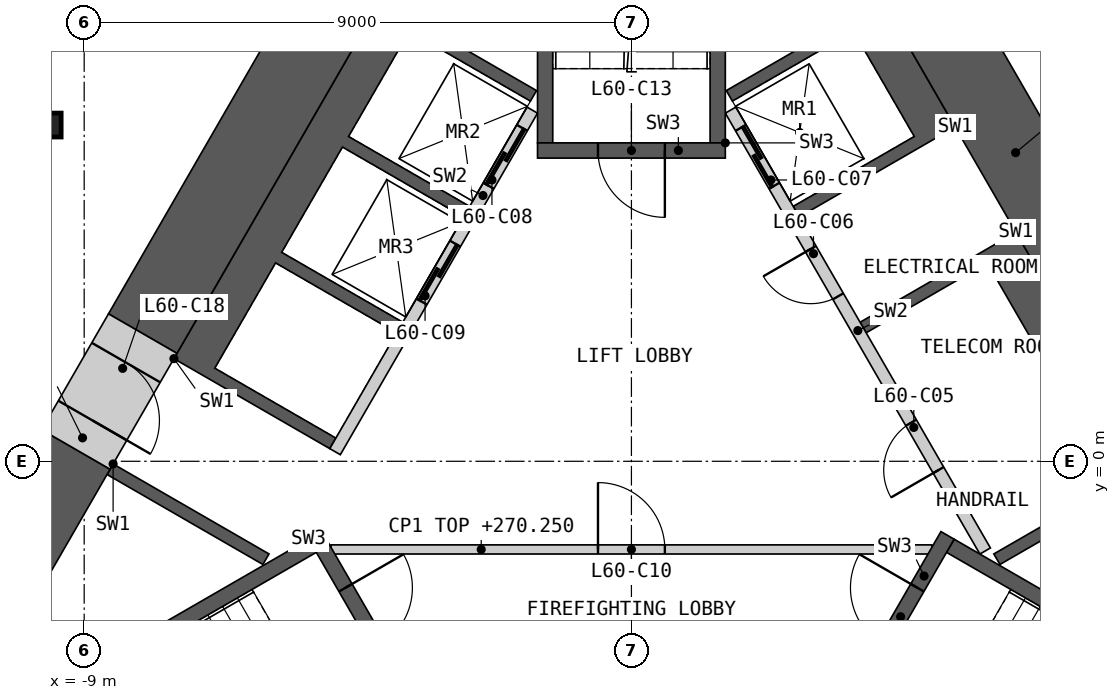
"""IFC4 building model, lengths in metres.
Left out: names, types, materials, properties, quantities, classifications, styles, units other than length and angle.
Written with IfcOpenShell. Run it as: python <this file> out.ifc"""

import sys

from ifc_helpers import new_model, si_unit, direction, frame, frame_2d, origin, origin_2d, place, context, subcontext, project, spatial, polyline, rectangle, i_section, outline, extrude, element, fill, save


model = new_model("IFC4")
c1 = context("Model", 3, precision=1e-05, world=origin(), true_north=direction((0.0, 1.0)))
c2 = subcontext(c1, "Body", "Model", "MODEL_VIEW")
j1 = project(units=[si_unit("LENGTHUNIT", "METRE"), si_unit("PLANEANGLEUNIT", "RADIAN")], contexts=[c1])
p1 = place(None, origin())
s1 = spatial("IfcSite", under=j1, at=p1, CompositionType="ELEMENT")
p2 = place(p1, origin())
s2 = spatial("IfcBuilding", under=s1, at=p2, CompositionType="ELEMENT")
p3 = place(p2, frame((0.0, 0.0, 267.0)))
s3 = spatial("IfcBuildingStorey", under=s2, at=p3, CompositionType="ELEMENT", Elevation=267.0)
p4 = place(p3, frame((-9.578, 5.53, 0.0), z_axis=(0.0, 0.0, 1.0), x_axis=(1.0, 0.0, 0.0)))
e1 = element("IfcColumn", 1, at=p4, inside=s3, PredefinedType="COLUMN", context=c2, shape_type="SweptSolid", body=[
    extrude(i_section(OverallWidth=0.399, OverallDepth=0.393, WebThickness=0.023, FlangeThickness=0.037, at=origin_2d()), origin(), (0.0, 0.0, 1.0), 3.6),
])
p5 = place(p3, origin())
e2 = element("IfcWall", 2, at=p5, inside=s3, PredefinedType="SHEAR", context=c2, shape_type="SweptSolid", body=[
    extrude(outline(polyline([(6.324, 3.767), (8.624, -0.217), (8.231, -0.444), (6.061, -1.697), (5.96, -1.524), (7.952, -0.374), (5.852, 3.263), (3.861, 2.113), (3.76, 2.287), (5.931, 3.54), (6.324, 3.767)])), origin(), (0.0, 0.0, 1.0), 3.25),
])
p6 = place(p3, origin())
e3 = element("IfcWall", 3, at=p6, inside=s3, PredefinedType="SHEAR", context=c2, shape_type="SweptSolid", body=[
    extrude(outline(polyline([(5.324, 5.499), (4.931, 5.272), (2.76, 4.019), (2.66, 4.192), (4.652, 5.342), (3.652, 7.074), (1.66, 5.924), (1.561, 6.097), (3.731, 7.35), (4.124, 7.577), (5.324, 5.499)])), origin(), (0.0, 0.0, 1.0), 3.25),
])
p7 = place(p3, frame((5.817, -1.476, 0.0), z_axis=(0.0, 0.0, 1.0), x_axis=(-0.500002616675, 0.866023893041, 0.0)))
e4 = element("IfcWall", 4, at=p7, inside=s3, PredefinedType="SOLIDWALL", context=c2, shape_type="SweptSolid", body=[
    extrude(rectangle(XDim=8.373, YDim=0.2, at=frame_2d((4.187, 0.0))), origin(), (0.0, 0.0, 1.0), 3.25),
])
p8 = place(p7, frame((1.537, 0.0, 0.0)))
e5 = element("IfcOpeningElement", 5, at=p8, cuts=e4, PredefinedType="OPENING", context=c2, shape_type="SweptSolid", body=[
    extrude(rectangle(XDim=0.9, YDim=2.1, at=frame_2d((0.45, 1.05))), frame((0.0, 0.11, 0.0), z_axis=(0.0, -1.0, 0.0), x_axis=(1.0, 0.0, 0.0)), (0.0, 0.0, 1.0), 0.22),
])
p9 = place(p7, frame((4.837, 0.0, 0.0)))
e6 = element("IfcOpeningElement", 6, at=p9, cuts=e4, PredefinedType="OPENING", context=c2, shape_type="SweptSolid", body=[
    extrude(rectangle(XDim=0.9, YDim=2.1, at=frame_2d((0.45, 1.05))), frame((0.0, 0.11, 0.0), z_axis=(0.0, -1.0, 0.0), x_axis=(1.0, 0.0, 0.0)), (0.0, 0.0, 1.0), 0.22),
])
p10 = place(p7, frame((6.937, 0.0, 0.0)))
e7 = element("IfcOpeningElement", 7, at=p10, cuts=e4, PredefinedType="OPENING", context=c2, shape_type="SweptSolid", body=[
    extrude(rectangle(XDim=1.1, YDim=2.1, at=frame_2d((0.55, 1.05))), frame((0.0, 0.11, 0.0), z_axis=(0.0, -1.0, 0.0), x_axis=(1.0, 0.0, 0.0)), (0.0, 0.0, 1.0), 0.22),
])
p11 = place(p3, origin())
e8 = element("IfcWall", 8, at=p11, inside=s3, PredefinedType="SHEAR", context=c2, shape_type="SweptSolid", body=[
    extrude(outline(polyline([(-7.524, 1.688), (-4.124, 7.577), (-3.731, 7.35), (-1.561, 6.097), (-1.66, 5.924), (-3.652, 7.074), (-4.652, 5.342), (-2.66, 4.192), (-2.76, 4.019), (-4.752, 5.169), (-5.752, 3.437), (-3.76, 2.287), (-3.861, 2.113), (-5.852, 3.263), (-6.852, 1.531), (-4.861, 0.381), (-4.96, 0.208), (-7.131, 1.461), (-7.524, 1.688)])), origin(), (0.0, 0.0, 1.0), 3.25),
])
p12 = place(p3, origin())
e9 = element("IfcWall", 9, at=p12, inside=s3, PredefinedType="SHEAR", context=c2, shape_type="SweptSolid", body=[
    extrude(outline(polyline([(-8.524, -0.044), (-8.131, -0.271), (-5.96, -1.524), (-6.061, -1.697), (-8.231, -0.444), (-8.624, -0.217), (-8.524, -0.044)])), origin(), (0.0, 0.0, 1.0), 3.25),
])
p13 = place(p3, frame((-1.631, 5.776, 0.0), z_axis=(0.0, 0.0, 1.0), x_axis=(-0.499992876559, -0.866029516466, 0.0)))
e10 = element("IfcWall", 10, at=p13, inside=s3, PredefinedType="SOLIDWALL", context=c2, shape_type="SweptSolid", body=[
    extrude(rectangle(XDim=6.486, YDim=0.2, at=frame_2d((3.243, 0.0))), origin(), (0.0, 0.0, 1.0), 3.25),
])
p14 = place(p13, frame((0.337, 0.0, 0.0)))
e11 = element("IfcOpeningElement", 11, at=p14, cuts=e10, PredefinedType="OPENING", context=c2, shape_type="SweptSolid", body=[
    extrude(rectangle(XDim=1.1, YDim=2.1, at=frame_2d((0.55, 1.05))), frame((0.0, 0.11, 0.0), z_axis=(0.0, -1.0, 0.0), x_axis=(1.0, 0.0, 0.0)), (0.0, 0.0, 1.0), 0.22),
])
p15 = place(p13, frame((2.537, 0.0, 0.0)))
e12 = element("IfcOpeningElement", 12, at=p15, cuts=e10, PredefinedType="OPENING", context=c2, shape_type="SweptSolid", body=[
    extrude(rectangle(XDim=1.1, YDim=2.1, at=frame_2d((0.55, 1.05))), frame((0.0, 0.11, 0.0), z_axis=(0.0, -1.0, 0.0), x_axis=(1.0, 0.0, 0.0)), (0.0, 0.0, 1.0), 0.22),
])
p16 = place(p3, frame((-4.941, -1.45, 0.0), z_axis=(0.0, 0.0, 1.0), x_axis=(1.0, 0.0, 0.0)))
e13 = element("IfcWall", 13, at=p16, inside=s3, PredefinedType="PARTITIONING", context=c2, shape_type="SweptSolid", body=[
    extrude(rectangle(XDim=9.882, YDim=0.15, at=frame_2d((4.941, 0.0))), origin(), (0.0, 0.0, 1.0), 3.25),
])
p17 = place(p16, frame((4.391, 0.0, 0.0)))
e14 = element("IfcOpeningElement", 14, at=p17, cuts=e13, PredefinedType="OPENING", context=c2, shape_type="SweptSolid", body=[
    extrude(rectangle(XDim=1.1, YDim=2.1, at=frame_2d((0.55, 1.05))), frame((0.0, 0.085, 0.0), z_axis=(0.0, -1.0, 0.0), x_axis=(1.0, 0.0, 0.0)), (0.0, 0.0, 1.0), 0.17),
])
p18 = place(p3, origin())
e15 = element("IfcWall", 15, at=p18, inside=s3, PredefinedType="SHEAR", context=c2, shape_type="SweptSolid", body=[
    extrude(outline(polyline([(-5.307, -1.281), (-10.374, -4.206), (-10.032, -4.298), (-5.182, -1.498), (-5.307, -1.281)])), origin(), (0.0, 0.0, 1.0), 3.25),
])
p19 = place(p3, frame((-5.199, -1.219, 0.0), z_axis=(0.0, 0.0, 1.0), x_axis=(0.499982516597, -0.866035497597, 0.0)))
e16 = element("IfcWall", 16, at=p19, inside=s3, PredefinedType="SHEAR", context=c2, shape_type="SweptSolid", body=[
    extrude(rectangle(XDim=3.088, YDim=0.25, at=frame_2d((1.544, 0.0))), origin(), (0.0, 0.0, 1.0), 3.25),
])
p20 = place(p19, frame((0.994, 0.0, 0.0)))
e17 = element("IfcOpeningElement", 17, at=p20, cuts=e16, PredefinedType="OPENING", context=c2, shape_type="SweptSolid", body=[
    extrude(rectangle(XDim=1.1, YDim=2.1, at=frame_2d((0.55, 1.05))), frame((0.0, 0.135, 0.0), z_axis=(0.0, -1.0, 0.0), x_axis=(1.0, 0.0, 0.0)), (0.0, 0.0, 1.0), 0.27),
])
p21 = place(p3, origin())
e18 = element("IfcWall", 18, at=p21, inside=s3, PredefinedType="SHEAR", context=c2, shape_type="SweptSolid", body=[
    extrude(outline(polyline([(10.032, -4.298), (10.374, -4.206), (5.307, -1.281), (5.182, -1.498), (10.032, -4.298)])), origin(), (0.0, 0.0, 1.0), 3.25),
])
p22 = place(p3, frame((3.655, -3.893, 0.0), z_axis=(0.0, 0.0, 1.0), x_axis=(0.499982516597, 0.866035497597, 0.0)))
e19 = element("IfcWall", 19, at=p22, inside=s3, PredefinedType="SHEAR", context=c2, shape_type="SweptSolid", body=[
    extrude(rectangle(XDim=3.088, YDim=0.25, at=frame_2d((1.544, 0.0))), origin(), (0.0, 0.0, 1.0), 3.25),
])
p23 = place(p22, frame((0.994, 0.0, 0.0)))
e20 = element("IfcOpeningElement", 20, at=p23, cuts=e19, PredefinedType="OPENING", context=c2, shape_type="SweptSolid", body=[
    extrude(rectangle(XDim=1.1, YDim=2.1, at=frame_2d((0.55, 1.05))), frame((0.0, 0.135, 0.0), z_axis=(0.0, -1.0, 0.0), x_axis=(1.0, 0.0, 0.0)), (0.0, 0.0, 1.0), 0.27),
])
p24 = place(p3, origin())
e21 = element("IfcWall", 21, at=p24, inside=s3, PredefinedType="SHEAR", context=c2, shape_type="SweptSolid", body=[
    extrude(outline(polyline([(1.544, 5.237), (1.544, 11.087), (1.294, 10.837), (1.294, 5.237), (1.544, 5.237)])), origin(), (0.0, 0.0, 1.0), 3.25),
])
p25 = place(p3, origin())
e22 = element("IfcWall", 22, at=p25, inside=s3, PredefinedType="SHEAR", context=c2, shape_type="SweptSolid", body=[
    extrude(outline(polyline([(-1.294, 10.837), (-1.544, 11.087), (-1.544, 5.237), (-1.294, 5.237), (-1.294, 10.837)])), origin(), (0.0, 0.0, 1.0), 3.25),
])
p26 = place(p3, frame((1.544, 5.112, 0.0), z_axis=(0.0, 0.0, 1.0), x_axis=(-1.0, 0.0, 0.0)))
e23 = element("IfcWall", 23, at=p26, inside=s3, PredefinedType="SHEAR", context=c2, shape_type="SweptSolid", body=[
    extrude(rectangle(XDim=3.088, YDim=0.25, at=frame_2d((1.544, 0.0))), origin(), (0.0, 0.0, 1.0), 3.25),
])
p27 = place(p26, frame((0.994, 0.0, 0.0)))
e24 = element("IfcOpeningElement", 24, at=p27, cuts=e23, PredefinedType="OPENING", context=c2, shape_type="SweptSolid", body=[
    extrude(rectangle(XDim=1.1, YDim=2.1, at=frame_2d((0.55, 1.05))), frame((0.0, 0.135, 0.0), z_axis=(0.0, -1.0, 0.0), x_axis=(1.0, 0.0, 0.0)), (0.0, 0.0, 1.0), 0.27),
])
p28 = place(p3, frame((10.081, -1.441, 0.0), z_axis=(0.0, 0.0, 1.0), x_axis=(-0.500012180433, 0.866018371294, 0.0)))
e25 = element("IfcWall", 25, at=p28, inside=s3, PredefinedType="SHEAR", context=c2, shape_type="SweptSolid", body=[
    extrude(rectangle(XDim=15.05, YDim=1.3, at=frame_2d((7.525, 0.0))), origin(), (0.0, 0.0, 1.0), 3.25),
])
p29 = place(p3, frame((-4.636, 7.99, 0.0), z_axis=(0.0, 0.0, 1.0), x_axis=(-0.500022813292, -0.866012232124, 0.0)))
e26 = element("IfcWall", 26, at=p29, inside=s3, PredefinedType="SHEAR", context=c2, shape_type="SweptSolid", body=[
    extrude(rectangle(XDim=6.802, YDim=1.3, at=frame_2d((3.401, 0.0))), origin(), (0.0, 0.0, 1.0), 3.25),
])
p30 = place(p3, frame((-9.137, 0.195, 0.0), z_axis=(0.0, 0.0, 1.0), x_axis=(-0.499985697398, -0.866033661238, 0.0)))
e27 = element("IfcWall", 27, at=p30, inside=s3, PredefinedType="SHEAR", context=c2, shape_type="SweptSolid", body=[
    extrude(rectangle(XDim=4.362, YDim=1.3, at=frame_2d((2.181, 0.0))), origin(), (0.0, 0.0, 1.0), 3.25),
])
p31 = place(p3, frame((-8.037, 2.1, 0.0), z_axis=(0.0, 0.0, 1.0), x_axis=(-0.50002983664, -0.866008176907, 0.0)))
e28 = element("IfcWall", 28, at=p31, inside=s3, PredefinedType="SHEAR", context=c2, shape_type="SweptSolid", body=[
    extrude(rectangle(XDim=2.2, YDim=1.3, at=frame_2d((1.1, 0.0))), origin(), (0.0, 0.0, 1.0), 3.25),
])
p32 = place(p31, frame((0.55, 0.0, 0.0)))
e29 = element("IfcOpeningElement", 29, at=p32, cuts=e28, PredefinedType="OPENING", context=c2, shape_type="SweptSolid", body=[
    extrude(rectangle(XDim=1.1, YDim=2.1, at=frame_2d((0.55, 1.05))), frame((0.0, 0.66, 0.0), z_axis=(0.0, -1.0, 0.0), x_axis=(1.0, 0.0, 0.0)), (0.0, 0.0, 1.0), 1.32),
])
p33 = place(p3, frame((-18.976, -4.747, 0.0), z_axis=(0.0, 0.0, 1.0), x_axis=(0.499999852422, 0.866025488988, 0.0)))
e30 = element("IfcWall", 30, at=p33, inside=s3, PredefinedType="PARTITIONING", context=c2, shape_type="SweptSolid", body=[
    extrude(rectangle(XDim=27.198, YDim=0.2, at=frame_2d((13.599, 0.0))), origin(), (0.0, 0.0, 1.0), 3.25),
])
p34 = place(p33, frame((19.886, 0.0, 0.0)))
e31 = element("IfcOpeningElement", 31, at=p34, cuts=e30, PredefinedType="OPENING", context=c2, shape_type="SweptSolid", body=[
    extrude(rectangle(XDim=0.95, YDim=2.1, at=frame_2d((0.475, 1.05))), frame((0.0, 0.11, 0.0), z_axis=(0.0, -1.0, 0.0), x_axis=(1.0, 0.0, 0.0)), (0.0, 0.0, 1.0), 0.22),
])
p35 = place(p33, frame((11.895, 0.0, 0.0)))
e32 = element("IfcOpeningElement", 32, at=p35, cuts=e30, PredefinedType="OPENING", context=c2, shape_type="SweptSolid", body=[
    extrude(rectangle(XDim=1.1, YDim=2.1, at=frame_2d((0.55, 1.05))), frame((0.0, 0.11, 0.0), z_axis=(0.0, -1.0, 0.0), x_axis=(1.0, 0.0, 0.0)), (0.0, 0.0, 1.0), 0.22),
])
p36 = place(p33, frame((1.152, 0.0, 0.0)))
e33 = element("IfcOpeningElement", 33, at=p36, cuts=e30, PredefinedType="OPENING", context=c2, shape_type="SweptSolid", body=[
    extrude(rectangle(XDim=0.95, YDim=2.1, at=frame_2d((0.475, 1.05))), frame((0.0, 0.11, 0.0), z_axis=(0.0, -1.0, 0.0), x_axis=(1.0, 0.0, 0.0)), (0.0, 0.0, 1.0), 0.22),
])
p37 = place(p3, frame((4.91, 13.616, 0.0), z_axis=(0.0, 0.0, 1.0), x_axis=(0.50000207303, -0.866024206917, 0.0)))
e34 = element("IfcWall", 34, at=p37, inside=s3, PredefinedType="PARTITIONING", context=c2, shape_type="SweptSolid", body=[
    extrude(rectangle(XDim=9.095, YDim=0.2, at=frame_2d((4.547, 0.0))), origin(), (0.0, 0.0, 1.0), 3.25),
])
p38 = place(p37, frame((3.698, 0.0, 0.0)))
e35 = element("IfcOpeningElement", 35, at=p38, cuts=e34, PredefinedType="OPENING", context=c2, shape_type="SweptSolid", body=[
    extrude(rectangle(XDim=1.8, YDim=2.1, at=frame_2d((0.9, 1.05))), frame((0.0, 0.11, 0.0), z_axis=(0.0, -1.0, 0.0), x_axis=(1.0, 0.0, 0.0)), (0.0, 0.0, 1.0), 0.22),
])
p39 = place(p8, origin())
e36 = element("IfcDoor", 36, at=p39, inside=s3, OperationType="SINGLE_SWING_LEFT", PredefinedType="DOOR", context=c2, shape_type="SweptSolid", body=[
    extrude(rectangle(XDim=0.9, YDim=2.1, at=frame_2d((0.45, 1.05))), frame((0.0, 0.025, 0.0), z_axis=(0.0, -1.0, 0.0), x_axis=(1.0, 0.0, 0.0)), (0.0, 0.0, 1.0), 0.05),
])
fill(e5, e36)
p40 = place(p9, origin())
e37 = element("IfcDoor", 37, at=p40, inside=s3, OperationType="SINGLE_SWING_RIGHT", PredefinedType="DOOR", context=c2, shape_type="SweptSolid", body=[
    extrude(rectangle(XDim=0.9, YDim=2.1, at=frame_2d((0.45, 1.05))), frame((0.0, 0.025, 0.0), z_axis=(0.0, -1.0, 0.0), x_axis=(1.0, 0.0, 0.0)), (0.0, 0.0, 1.0), 0.05),
])
fill(e6, e37)
p41 = place(p10, origin())
e38 = element("IfcDoor", 38, at=p41, inside=s3, OperationType="SLIDING_TO_LEFT", PredefinedType="DOOR", context=c2, shape_type="SweptSolid", body=[
    extrude(rectangle(XDim=1.1, YDim=2.1, at=frame_2d((0.55, 1.05))), frame((0.0, 0.025, 0.0), z_axis=(0.0, -1.0, 0.0), x_axis=(1.0, 0.0, 0.0)), (0.0, 0.0, 1.0), 0.05),
])
fill(e7, e38)
p42 = place(p14, origin())
e39 = element("IfcDoor", 39, at=p42, inside=s3, OperationType="SLIDING_TO_LEFT", PredefinedType="DOOR", context=c2, shape_type="SweptSolid", body=[
    extrude(rectangle(XDim=1.1, YDim=2.1, at=frame_2d((0.55, 1.05))), frame((0.0, 0.025, 0.0), z_axis=(0.0, -1.0, 0.0), x_axis=(1.0, 0.0, 0.0)), (0.0, 0.0, 1.0), 0.05),
])
fill(e11, e39)
p43 = place(p15, origin())
e40 = element("IfcDoor", 40, at=p43, inside=s3, OperationType="SLIDING_TO_LEFT", PredefinedType="DOOR", context=c2, shape_type="SweptSolid", body=[
    extrude(rectangle(XDim=1.1, YDim=2.1, at=frame_2d((0.55, 1.05))), frame((0.0, 0.025, 0.0), z_axis=(0.0, -1.0, 0.0), x_axis=(1.0, 0.0, 0.0)), (0.0, 0.0, 1.0), 0.05),
])
fill(e12, e40)
p44 = place(p17, origin())
e41 = element("IfcDoor", 41, at=p44, inside=s3, OperationType="SINGLE_SWING_LEFT", PredefinedType="DOOR", context=c2, shape_type="SweptSolid", body=[
    extrude(rectangle(XDim=1.1, YDim=2.1, at=frame_2d((0.55, 1.05))), frame((0.0, 0.025, 0.0), z_axis=(0.0, -1.0, 0.0), x_axis=(1.0, 0.0, 0.0)), (0.0, 0.0, 1.0), 0.05),
])
fill(e14, e41)
p45 = place(p20, origin())
e42 = element("IfcDoor", 42, at=p45, inside=s3, OperationType="SINGLE_SWING_LEFT", PredefinedType="DOOR", context=c2, shape_type="SweptSolid", body=[
    extrude(rectangle(XDim=1.1, YDim=2.1, at=frame_2d((0.55, 1.05))), frame((0.0, 0.025, 0.0), z_axis=(0.0, -1.0, 0.0), x_axis=(1.0, 0.0, 0.0)), (0.0, 0.0, 1.0), 0.05),
])
fill(e17, e42)
p46 = place(p23, origin())
e43 = element("IfcDoor", 43, at=p46, inside=s3, OperationType="SINGLE_SWING_RIGHT", PredefinedType="DOOR", context=c2, shape_type="SweptSolid", body=[
    extrude(rectangle(XDim=1.1, YDim=2.1, at=frame_2d((0.55, 1.05))), frame((0.0, 0.025, 0.0), z_axis=(0.0, -1.0, 0.0), x_axis=(1.0, 0.0, 0.0)), (0.0, 0.0, 1.0), 0.05),
])
fill(e20, e43)
p47 = place(p27, origin())
e44 = element("IfcDoor", 44, at=p47, inside=s3, OperationType="SINGLE_SWING_LEFT", PredefinedType="DOOR", context=c2, shape_type="SweptSolid", body=[
    extrude(rectangle(XDim=1.1, YDim=2.1, at=frame_2d((0.55, 1.05))), frame((0.0, 0.025, 0.0), z_axis=(0.0, -1.0, 0.0), x_axis=(1.0, 0.0, 0.0)), (0.0, 0.0, 1.0), 0.05),
])
fill(e24, e44)
p48 = place(p32, origin())
e45 = element("IfcDoor", 45, at=p48, inside=s3, OperationType="SINGLE_SWING_RIGHT", PredefinedType="DOOR", context=c2, shape_type="SweptSolid", body=[
    extrude(rectangle(XDim=1.1, YDim=2.1, at=frame_2d((0.55, 1.05))), frame((0.0, 0.405, 0.0), z_axis=(0.0, -1.0, 0.0), x_axis=(1.0, 0.0, 0.0)), (0.0, 0.0, 1.0), 0.05),
])
fill(e29, e45)
save(model, sys.argv[1])
